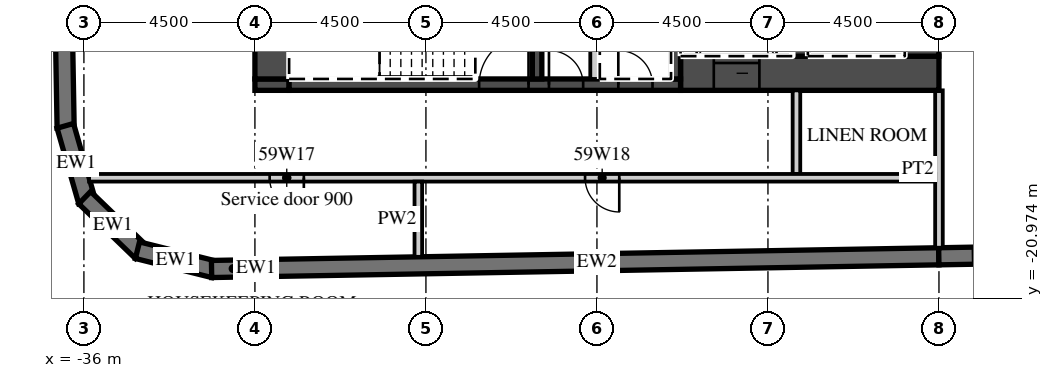
"""IFC4 building model, lengths in metres.
Left out: names, types, materials, properties, quantities, classifications, styles, units other than length and angle.
Written with IfcOpenShell. Run it as: python <this file> out.ifc"""

import sys

from ifc_helpers import new_model, si_unit, direction, frame, frame_2d, origin, place, context, subcontext, project, spatial, polyline, rectangle, outline, extrude, element, fill, save


model = new_model("IFC4")
c1 = context("Model", 3, precision=1e-05, world=origin(), true_north=direction((0.0, 1.0)))
c2 = subcontext(c1, "Body", "Model", "MODEL_VIEW")
j1 = project(units=[si_unit("LENGTHUNIT", "METRE"), si_unit("PLANEANGLEUNIT", "RADIAN")], contexts=[c1])
p1 = place(None, origin())
s1 = spatial("IfcSite", under=j1, at=p1, CompositionType="ELEMENT")
p2 = place(p1, origin())
s2 = spatial("IfcBuilding", under=s1, at=p2, CompositionType="ELEMENT")
p3 = place(p2, frame((0.0, 0.0, 240.8)))
s3 = spatial("IfcBuildingStorey", under=s2, at=p3, CompositionType="ELEMENT", Elevation=240.8)
p4 = place(p3, frame((-37.057, 16.503, 0.0), z_axis=(0.0, 0.0, 1.0), x_axis=(0.017452279857, -0.999847697366, 0.0)))
e1 = element("IfcWall", 1, at=p4, inside=s3, PredefinedType="SOLIDWALL", context=c2, shape_type="SweptSolid", body=[
    extrude(rectangle(XDim=33.0, YDim=0.45, at=frame_2d((16.5, 0.0))), origin(), (0.0, 0.0, 1.0), 3.02),
])
p5 = place(p3, frame((-36.49, -16.434, 0.0), z_axis=(0.0, 0.0, 1.0), x_axis=(0.275577603096, -0.961278827745, 0.0)))
e2 = element("IfcWall", 2, at=p5, inside=s3, PredefinedType="SOLIDWALL", context=c2, shape_type="SweptSolid", body=[
    extrude(outline(polyline([(0.0, -0.225), (2.071, -0.225), (1.95, 0.225), (0.121, 0.225), (0.0, -0.225)])), origin(), (0.0, 0.0, 1.0), 3.02),
])
p6 = place(p3, frame((-35.979, -18.324, 0.0), z_axis=(0.0, 0.0, 1.0), x_axis=(0.719320193998, -0.694678672846, 0.0)))
e3 = element("IfcWall", 3, at=p6, inside=s3, PredefinedType="SOLIDWALL", context=c2, shape_type="SweptSolid", body=[
    extrude(outline(polyline([(0.0, -0.225), (2.071, -0.225), (1.95, 0.225), (0.121, 0.225), (0.0, -0.225)])), origin(), (0.0, 0.0, 1.0), 3.02),
])
p7 = place(p3, frame((-34.591, -19.706, 0.0), z_axis=(0.0, 0.0, 1.0), x_axis=(0.970315655375, -0.241841950319, 0.0)))
e4 = element("IfcWall", 4, at=p7, inside=s3, PredefinedType="SOLIDWALL", context=c2, shape_type="SweptSolid", body=[
    extrude(outline(polyline([(0.0, -0.225), (2.071, -0.225), (1.95, 0.225), (0.121, 0.225), (0.0, -0.225)])), origin(), (0.0, 0.0, 1.0), 3.02),
])
p8 = place(p3, frame((-32.641, -20.2, 0.0), z_axis=(0.0, 0.0, 1.0), x_axis=(0.99984870815, 0.017394275206, 0.0)))
e5 = element("IfcWall", 5, at=p8, inside=s3, PredefinedType="SOLIDWALL", context=c2, shape_type="SweptSolid", body=[
    extrude(rectangle(XDim=1.137, YDim=0.45, at=frame_2d((0.568, 0.0))), origin(), (0.0, 0.0, 1.0), 3.02),
])
p9 = place(p3, frame((-31.504, -20.18, 0.0), z_axis=(0.0, 0.0, 1.0), x_axis=(0.999847677887, 0.017453395744, 0.0)))
e6 = element("IfcWall", 6, at=p9, inside=s3, PredefinedType="SOLIDWALL", context=c2, shape_type="SweptSolid", body=[
    extrude(rectangle(XDim=18.003, YDim=0.45, at=frame_2d((9.001, 0.0))), origin(), (0.0, 0.0, 1.0), 3.02),
])
p10 = place(p3, frame((-13.504, -19.866, 0.0), z_axis=(0.0, 0.0, 1.0), x_axis=(0.999847672978, 0.017453676992, 0.0)))
e7 = element("IfcWall", 7, at=p10, inside=s3, PredefinedType="SOLIDWALL", context=c2, shape_type="SweptSolid", body=[
    extrude(rectangle(XDim=52.86, YDim=0.45, at=frame_2d((26.43, 0.0))), origin(), (0.0, 0.0, 1.0), 3.02),
])
p11 = place(p10, frame((0.9, 0.0, 0.45)))
e8 = element("IfcOpeningElement", 8, at=p11, cuts=e7, PredefinedType="OPENING", context=c2, shape_type="SweptSolid", body=[
    extrude(rectangle(XDim=2.7, YDim=2.25, at=frame_2d((1.35, 1.125))), frame((0.0, 0.235, 0.0), z_axis=(0.0, -1.0, 0.0), x_axis=(1.0, 0.0, 0.0)), (0.0, 0.0, 1.0), 0.47),
])
p12 = place(p10, frame((5.401, 0.0, 0.45)))
e9 = element("IfcOpeningElement", 9, at=p12, cuts=e7, PredefinedType="OPENING", context=c2, shape_type="SweptSolid", body=[
    extrude(rectangle(XDim=2.7, YDim=2.25, at=frame_2d((1.35, 1.125))), frame((0.0, 0.235, 0.0), z_axis=(0.0, -1.0, 0.0), x_axis=(1.0, 0.0, 0.0)), (0.0, 0.0, 1.0), 0.47),
])
p13 = place(p10, frame((9.902, 0.0, 0.45)))
e10 = element("IfcOpeningElement", 10, at=p13, cuts=e7, PredefinedType="OPENING", context=c2, shape_type="SweptSolid", body=[
    extrude(rectangle(XDim=2.7, YDim=2.25, at=frame_2d((1.35, 1.125))), frame((0.0, 0.235, 0.0), z_axis=(0.0, -1.0, 0.0), x_axis=(1.0, 0.0, 0.0)), (0.0, 0.0, 1.0), 0.47),
])
p14 = place(p10, frame((14.402, 0.0, 0.45)))
e11 = element("IfcOpeningElement", 11, at=p14, cuts=e7, PredefinedType="OPENING", context=c2, shape_type="SweptSolid", body=[
    extrude(rectangle(XDim=2.7, YDim=2.25, at=frame_2d((1.35, 1.125))), frame((0.0, 0.235, 0.0), z_axis=(0.0, -1.0, 0.0), x_axis=(1.0, 0.0, 0.0)), (0.0, 0.0, 1.0), 0.47),
])
p15 = place(p10, frame((18.903, 0.0, 0.45)))
e12 = element("IfcOpeningElement", 12, at=p15, cuts=e7, PredefinedType="OPENING", context=c2, shape_type="SweptSolid", body=[
    extrude(rectangle(XDim=2.7, YDim=2.25, at=frame_2d((1.35, 1.125))), frame((0.0, 0.235, 0.0), z_axis=(0.0, -1.0, 0.0), x_axis=(1.0, 0.0, 0.0)), (0.0, 0.0, 1.0), 0.47),
])
p16 = place(p10, frame((23.404, 0.0, 0.45)))
e13 = element("IfcOpeningElement", 13, at=p16, cuts=e7, PredefinedType="OPENING", context=c2, shape_type="SweptSolid", body=[
    extrude(rectangle(XDim=2.7, YDim=2.25, at=frame_2d((1.35, 1.125))), frame((0.0, 0.235, 0.0), z_axis=(0.0, -1.0, 0.0), x_axis=(1.0, 0.0, 0.0)), (0.0, 0.0, 1.0), 0.47),
])
p17 = place(p10, frame((27.904, 0.0, 0.45)))
e14 = element("IfcOpeningElement", 14, at=p17, cuts=e7, PredefinedType="OPENING", context=c2, shape_type="SweptSolid", body=[
    extrude(rectangle(XDim=2.7, YDim=2.25, at=frame_2d((1.35, 1.125))), frame((0.0, 0.235, 0.0), z_axis=(0.0, -1.0, 0.0), x_axis=(1.0, 0.0, 0.0)), (0.0, 0.0, 1.0), 0.47),
])
p18 = place(p10, frame((32.405, 0.0, 0.45)))
e15 = element("IfcOpeningElement", 15, at=p18, cuts=e7, PredefinedType="OPENING", context=c2, shape_type="SweptSolid", body=[
    extrude(rectangle(XDim=2.7, YDim=2.25, at=frame_2d((1.35, 1.125))), frame((0.0, 0.235, 0.0), z_axis=(0.0, -1.0, 0.0), x_axis=(1.0, 0.0, 0.0)), (0.0, 0.0, 1.0), 0.47),
])
p19 = place(p10, frame((36.906, 0.0, 0.45)))
e16 = element("IfcOpeningElement", 16, at=p19, cuts=e7, PredefinedType="OPENING", context=c2, shape_type="SweptSolid", body=[
    extrude(rectangle(XDim=2.7, YDim=2.25, at=frame_2d((1.35, 1.125))), frame((0.0, 0.235, 0.0), z_axis=(0.0, -1.0, 0.0), x_axis=(1.0, 0.0, 0.0)), (0.0, 0.0, 1.0), 0.47),
])
p20 = place(p10, frame((41.406, 0.0, 0.45)))
e17 = element("IfcOpeningElement", 17, at=p20, cuts=e7, PredefinedType="OPENING", context=c2, shape_type="SweptSolid", body=[
    extrude(rectangle(XDim=2.7, YDim=2.25, at=frame_2d((1.35, 1.125))), frame((0.0, 0.235, 0.0), z_axis=(0.0, -1.0, 0.0), x_axis=(1.0, 0.0, 0.0)), (0.0, 0.0, 1.0), 0.47),
])
p21 = place(p10, frame((45.907, 0.0, 0.45)))
e18 = element("IfcOpeningElement", 18, at=p21, cuts=e7, PredefinedType="OPENING", context=c2, shape_type="SweptSolid", body=[
    extrude(rectangle(XDim=2.7, YDim=2.25, at=frame_2d((1.35, 1.125))), frame((0.0, 0.235, 0.0), z_axis=(0.0, -1.0, 0.0), x_axis=(1.0, 0.0, 0.0)), (0.0, 0.0, 1.0), 0.47),
])
p22 = place(p3, frame((-13.5, -19.641, 0.0), z_axis=(0.0, 0.0, 1.0), x_axis=(0.0, 1.0, 0.0)))
e19 = element("IfcWall", 19, at=p22, inside=s3, PredefinedType="PARTITIONING", context=c2, shape_type="SweptSolid", body=[
    extrude(rectangle(XDim=4.141, YDim=0.2, at=frame_2d((2.071, 0.0))), origin(), (0.0, 0.0, 1.0), 3.02),
])
p23 = place(p3, frame((-20.3, -15.05, 0.0), z_axis=(0.0, 0.0, 1.0), x_axis=(1.0, 0.0, 0.0)))
e20 = element("IfcWall", 20, at=p23, inside=s3, PredefinedType="SHEAR", context=c2, shape_type="SweptSolid", body=[
    extrude(rectangle(XDim=6.8, YDim=0.9, at=frame_2d((3.4, 0.0))), origin(), (0.0, 0.0, 1.0), 3.02),
])
p24 = place(p23, frame((0.875, 0.0, 0.0)))
e21 = element("IfcOpeningElement", 21, at=p24, cuts=e20, PredefinedType="OPENING", context=c2, shape_type="SweptSolid", body=[
    extrude(rectangle(XDim=1.2, YDim=2.1, at=frame_2d((0.6, 1.05))), frame((0.0, 0.46, 0.0), z_axis=(0.0, -1.0, 0.0), x_axis=(1.0, 0.0, 0.0)), (0.0, 0.0, 1.0), 0.92),
])
p25 = place(p3, frame((-31.5, -15.35, 0.0), z_axis=(0.0, 0.0, 1.0), x_axis=(1.0, 0.0, 0.0)))
e22 = element("IfcWall", 22, at=p25, inside=s3, PredefinedType="SHEAR", context=c2, shape_type="SweptSolid", body=[
    extrude(rectangle(XDim=0.9, YDim=0.3, at=frame_2d((0.45, 0.0))), origin(), (0.0, 0.0, 1.0), 3.02),
])
p26 = place(p3, frame((-30.6, -15.35, 0.0), z_axis=(0.0, 0.0, 1.0), x_axis=(1.0, 0.0, 0.0)))
e23 = element("IfcWall", 23, at=p26, inside=s3, PredefinedType="SHEAR", context=c2, shape_type="SweptSolid", body=[
    extrude(rectangle(XDim=10.3, YDim=0.3, at=frame_2d((5.15, 0.0))), origin(), (0.0, 0.0, 1.0), 3.02),
])
p27 = place(p26, frame((5.0, 0.0, 0.0)))
e24 = element("IfcOpeningElement", 24, at=p27, cuts=e23, PredefinedType="OPENING", context=c2, shape_type="SweptSolid", body=[
    extrude(rectangle(XDim=1.3, YDim=2.1, at=frame_2d((0.65, 1.05))), frame((0.0, 0.16, 0.0), z_axis=(0.0, -1.0, 0.0), x_axis=(1.0, 0.0, 0.0)), (0.0, 0.0, 1.0), 0.32),
])
p28 = place(p26, frame((6.837, 0.0, 0.0)))
e25 = element("IfcOpeningElement", 25, at=p28, cuts=e23, PredefinedType="OPENING", context=c2, shape_type="SweptSolid", body=[
    extrude(rectangle(XDim=0.9, YDim=2.1, at=frame_2d((0.45, 1.05))), frame((0.0, 0.16, 0.0), z_axis=(0.0, -1.0, 0.0), x_axis=(1.0, 0.0, 0.0)), (0.0, 0.0, 1.0), 0.32),
])
p29 = place(p26, frame((8.663, 0.0, 0.0)))
e26 = element("IfcOpeningElement", 26, at=p29, cuts=e23, PredefinedType="OPENING", context=c2, shape_type="SweptSolid", body=[
    extrude(rectangle(XDim=0.9, YDim=2.1, at=frame_2d((0.45, 1.05))), frame((0.0, 0.16, 0.0), z_axis=(0.0, -1.0, 0.0), x_axis=(1.0, 0.0, 0.0)), (0.0, 0.0, 1.0), 0.32),
])
p30 = place(p3, frame((-31.05, -15.2, 0.0), z_axis=(0.0, 0.0, 1.0), x_axis=(0.0, 1.0, 0.0)))
e27 = element("IfcWall", 27, at=p30, inside=s3, PredefinedType="SHEAR", context=c2, shape_type="SweptSolid", body=[
    extrude(rectangle(XDim=12.8, YDim=0.9, at=frame_2d((6.4, 0.0))), origin(), (0.0, 0.0, 1.0), 3.02),
])
p31 = place(p30, frame((11.5, 0.0, 0.0)))
e28 = element("IfcOpeningElement", 28, at=p31, cuts=e27, PredefinedType="OPENING", context=c2, shape_type="SweptSolid", body=[
    extrude(rectangle(XDim=1.1, YDim=2.1, at=frame_2d((0.55, 1.05))), frame((0.0, 0.46, 0.0), z_axis=(0.0, -1.0, 0.0), x_axis=(1.0, 0.0, 0.0)), (0.0, 0.0, 1.0), 0.92),
])
p32 = place(p3, frame((-13.95, -14.6, 0.0), z_axis=(0.0, 0.0, 1.0), x_axis=(0.0, 1.0, 0.0)))
e29 = element("IfcWall", 29, at=p32, inside=s3, PredefinedType="SHEAR", context=c2, shape_type="SweptSolid", body=[
    extrude(rectangle(XDim=12.2, YDim=0.9, at=frame_2d((6.1, 0.0))), origin(), (0.0, 0.0, 1.0), 3.02),
])
p33 = place(p3, frame((-17.15, -14.6, 0.0), z_axis=(0.0, 0.0, 1.0), x_axis=(0.0, 1.0, 0.0)))
e30 = element("IfcWall", 30, at=p33, inside=s3, PredefinedType="SHEAR", context=c2, shape_type="SweptSolid", body=[
    extrude(rectangle(XDim=5.8, YDim=0.4, at=frame_2d((2.9, 0.0))), origin(), (0.0, 0.0, 1.0), 3.02),
])
for number, where, z_axis, x_axis in (
    (31, (-20.425, -15.2, 0.0), (0.0, 0.0, 1.0), (0.0, 1.0, 0.0)),
    (32, (-24.075, -15.2, 0.0), (0.0, 0.0, 1.0), (0.0, 1.0, 0.0)),
):
    element("IfcWall", number, at=place(p3, frame(where, z_axis=z_axis, x_axis=x_axis)), inside=s3, PredefinedType="SHEAR", context=c2, shape_type="SweptSolid", body=[
        extrude(rectangle(XDim=3.25, YDim=0.25, at=frame_2d((1.625, 0.0))), origin(), (0.0, 0.0, 1.0), 3.02),
    ])
p34 = place(p3, frame((-22.55, -15.2, 0.0), z_axis=(0.0, 0.0, 1.0), x_axis=(0.0, 1.0, 0.0)))
e33 = element("IfcWall", 33, at=p34, inside=s3, PredefinedType="PARTITIONING", context=c2, shape_type="SweptSolid", body=[
    extrude(rectangle(XDim=3.25, YDim=0.25, at=frame_2d((1.625, 0.0))), origin(), (0.0, 0.0, 1.0), 3.02),
])
p35 = place(p3, frame((-17.25, -17.7, 0.0), z_axis=(0.0, 0.0, 1.0), x_axis=(0.0, 1.0, 0.0)))
e34 = element("IfcWall", 34, at=p35, inside=s3, PredefinedType="PARTITIONING", context=c2, shape_type="SweptSolid", body=[
    extrude(rectangle(XDim=2.2, YDim=0.2, at=frame_2d((1.1, 0.0))), origin(), (0.0, 0.0, 1.0), 3.02),
])
p36 = place(p3, frame((-35.864, -17.8, 0.0), z_axis=(0.0, 0.0, 1.0), x_axis=(1.0, 0.0, 0.0)))
e35 = element("IfcWall", 35, at=p36, inside=s3, PredefinedType="PARTITIONING", context=c2, shape_type="SweptSolid", body=[
    extrude(rectangle(XDim=22.264, YDim=0.2, at=frame_2d((11.132, 0.0))), origin(), (0.0, 0.0, 1.0), 3.02),
])
p37 = place(p36, frame((4.751, 0.0, 0.0)))
e36 = element("IfcOpeningElement", 36, at=p37, cuts=e35, PredefinedType="OPENING", context=c2, shape_type="SweptSolid", body=[
    extrude(rectangle(XDim=0.9, YDim=2.1, at=frame_2d((0.45, 1.05))), frame((0.0, 0.11, 0.0), z_axis=(0.0, -1.0, 0.0), x_axis=(1.0, 0.0, 0.0)), (0.0, 0.0, 1.0), 0.22),
])
p38 = place(p36, frame((13.051, 0.0, 0.0)))
e37 = element("IfcOpeningElement", 37, at=p38, cuts=e35, PredefinedType="OPENING", context=c2, shape_type="SweptSolid", body=[
    extrude(rectangle(XDim=0.9, YDim=2.1, at=frame_2d((0.45, 1.05))), frame((0.0, 0.11, 0.0), z_axis=(0.0, -1.0, 0.0), x_axis=(1.0, 0.0, 0.0)), (0.0, 0.0, 1.0), 0.22),
])
p39 = place(p3, frame((-27.2, -19.88, 0.0), z_axis=(0.0, 0.0, 1.0), x_axis=(0.0, 1.0, 0.0)))
e38 = element("IfcWall", 38, at=p39, inside=s3, PredefinedType="PARTITIONING", context=c2, shape_type="SweptSolid", body=[
    extrude(rectangle(XDim=1.98, YDim=0.2, at=frame_2d((0.99, 0.0))), origin(), (0.0, 0.0, 1.0), 3.02),
])
p40 = place(p11, origin())
e39 = element("IfcWindow", 39, at=p40, inside=s3, PartitioningType="SINGLE_PANEL", PredefinedType="WINDOW", context=c2, shape_type="SweptSolid", body=[
    extrude(rectangle(XDim=2.7, YDim=2.25, at=frame_2d((1.35, 1.125))), frame((0.0, 0.09, 0.0), z_axis=(0.0, -1.0, 0.0), x_axis=(1.0, 0.0, 0.0)), (0.0, 0.0, 1.0), 0.06),
])
fill(e8, e39)
p41 = place(p24, origin())
e40 = element("IfcDoor", 40, at=p41, inside=s3, OperationType="SLIDING_TO_LEFT", PredefinedType="DOOR", context=c2, shape_type="SweptSolid", body=[
    extrude(rectangle(XDim=1.2, YDim=2.1, at=frame_2d((0.6, 1.05))), frame((0.0, 0.025, 0.0), z_axis=(0.0, -1.0, 0.0), x_axis=(1.0, 0.0, 0.0)), (0.0, 0.0, 1.0), 0.05),
])
fill(e21, e40)
p42 = place(p27, origin())
e41 = element("IfcDoor", 41, at=p42, inside=s3, OperationType="SINGLE_SWING_RIGHT", PredefinedType="DOOR", context=c2, shape_type="SweptSolid", body=[
    extrude(rectangle(XDim=1.3, YDim=2.1, at=frame_2d((0.65, 1.05))), frame((0.0, 0.025, 0.0), z_axis=(0.0, -1.0, 0.0), x_axis=(1.0, 0.0, 0.0)), (0.0, 0.0, 1.0), 0.05),
])
fill(e24, e41)
p43 = place(p28, origin())
e42 = element("IfcDoor", 42, at=p43, inside=s3, OperationType="SINGLE_SWING_LEFT", PredefinedType="DOOR", context=c2, shape_type="SweptSolid", body=[
    extrude(rectangle(XDim=0.9, YDim=2.1, at=frame_2d((0.45, 1.05))), frame((0.0, 0.025, 0.0), z_axis=(0.0, -1.0, 0.0), x_axis=(1.0, 0.0, 0.0)), (0.0, 0.0, 1.0), 0.05),
])
fill(e25, e42)
p44 = place(p29, origin())
e43 = element("IfcDoor", 43, at=p44, inside=s3, OperationType="SINGLE_SWING_LEFT", PredefinedType="DOOR", context=c2, shape_type="SweptSolid", body=[
    extrude(rectangle(XDim=0.9, YDim=2.1, at=frame_2d((0.45, 1.05))), frame((0.0, 0.025, 0.0), z_axis=(0.0, -1.0, 0.0), x_axis=(1.0, 0.0, 0.0)), (0.0, 0.0, 1.0), 0.05),
])
fill(e26, e43)
p45 = place(p37, origin())
e44 = element("IfcDoor", 44, at=p45, inside=s3, OperationType="SINGLE_SWING_RIGHT", PredefinedType="DOOR", context=c2, shape_type="SweptSolid", body=[
    extrude(rectangle(XDim=0.9, YDim=2.1, at=frame_2d((0.45, 1.05))), frame((0.0, 0.025, 0.0), z_axis=(0.0, -1.0, 0.0), x_axis=(1.0, 0.0, 0.0)), (0.0, 0.0, 1.0), 0.05),
])
fill(e36, e44)
p46 = place(p38, origin())
e45 = element("IfcDoor", 45, at=p46, inside=s3, OperationType="SINGLE_SWING_RIGHT", PredefinedType="DOOR", context=c2, shape_type="SweptSolid", body=[
    extrude(rectangle(XDim=0.9, YDim=2.1, at=frame_2d((0.45, 1.05))), frame((0.0, 0.025, 0.0), z_axis=(0.0, -1.0, 0.0), x_axis=(1.0, 0.0, 0.0)), (0.0, 0.0, 1.0), 0.05),
])
fill(e37, e45)
save(model, sys.argv[1])
